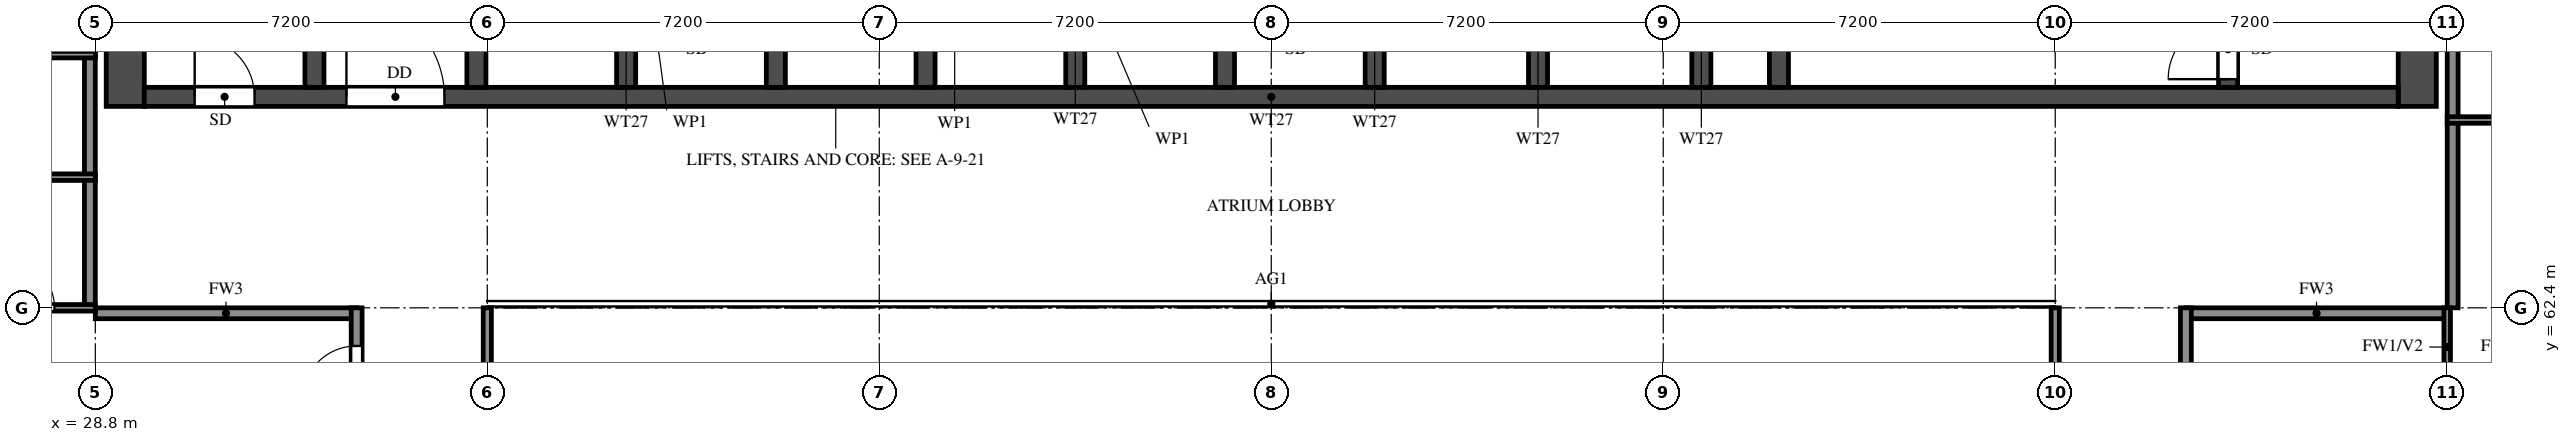
"""IFC4 building model, lengths in metres.
Left out: names, types, materials, properties, quantities, classifications, styles, units other than length and angle.
Written with IfcOpenShell. Run it as: python <this file> out.ifc"""

import sys

from ifc_helpers import new_model, si_unit, direction, frame, frame_2d, origin, place, context, subcontext, project, spatial, rectangle, extrude, element, fill, save


model = new_model("IFC4")
c1 = context("Model", 3, precision=1e-05, world=origin(), true_north=direction((0.0, 1.0)))
c2 = subcontext(c1, "Body", "Model", "MODEL_VIEW")
j1 = project(units=[si_unit("LENGTHUNIT", "METRE"), si_unit("PLANEANGLEUNIT", "RADIAN")], contexts=[c1])
p1 = place(None, origin())
s1 = spatial("IfcSite", under=j1, at=p1, CompositionType="ELEMENT")
p2 = place(p1, origin())
s2 = spatial("IfcBuilding", under=s1, at=p2, CompositionType="ELEMENT")
p3 = place(p2, frame((0.0, 0.0, 150.0)))
s3 = spatial("IfcBuildingStorey", under=s2, at=p3, CompositionType="ELEMENT", Elevation=150.0)
for number, where, z_axis, x_axis in (
    (1, (29.35, 66.1, 0.0), (0.0, 0.0, 1.0), (0.0, 1.0, 0.0)),
    (2, (71.45, 66.1, 0.0), (0.0, 0.0, 1.0), (0.0, 1.0, 0.0)),
):
    element("IfcWall", number, at=place(p3, frame(where, z_axis=z_axis, x_axis=x_axis)), inside=s3, PredefinedType="SHEAR", context=c2, shape_type="SweptSolid", body=[
        extrude(rectangle(XDim=11.9, YDim=0.7, at=frame_2d((5.95, 0.0))), origin(), (0.0, 0.0, 1.0), 3.2),
    ])
p4 = place(p3, frame((29.7, 66.275, 0.0), z_axis=(0.0, 0.0, 1.0), x_axis=(1.0, 0.0, 0.0)))
e3 = element("IfcWall", 3, at=p4, inside=s3, PredefinedType="SHEAR", context=c2, shape_type="SweptSolid", body=[
    extrude(rectangle(XDim=41.4, YDim=0.35, at=frame_2d((20.7, 0.0))), origin(), (0.0, 0.0, 1.0), 3.2),
])
p5 = place(p4, frame((0.925, 0.0, 0.0)))
e4 = element("IfcOpeningElement", 4, at=p5, cuts=e3, PredefinedType="OPENING", context=c2, shape_type="SweptSolid", body=[
    extrude(rectangle(XDim=1.1, YDim=2.1, at=frame_2d((0.55, 1.05))), frame((0.0, 0.185, 0.0), z_axis=(0.0, -1.0, 0.0), x_axis=(1.0, 0.0, 0.0)), (0.0, 0.0, 1.0), 0.37),
])
p6 = place(p4, frame((3.712, 0.0, 0.0)))
e5 = element("IfcOpeningElement", 5, at=p6, cuts=e3, PredefinedType="OPENING", context=c2, shape_type="SweptSolid", body=[
    extrude(rectangle(XDim=1.8, YDim=2.1, at=frame_2d((0.9, 1.05))), frame((0.0, 0.185, 0.0), z_axis=(0.0, -1.0, 0.0), x_axis=(1.0, 0.0, 0.0)), (0.0, 0.0, 1.0), 0.37),
])
p7 = place(p3, frame((32.825, 66.45, 0.0), z_axis=(0.0, 0.0, 1.0), x_axis=(0.0, 1.0, 0.0)))
e6 = element("IfcWall", 6, at=p7, inside=s3, PredefinedType="SHEAR", context=c2, shape_type="SweptSolid", body=[
    extrude(rectangle(XDim=10.85, YDim=0.35, at=frame_2d((5.425, 0.0))), origin(), (0.0, 0.0, 1.0), 3.2),
])
p8 = place(p3, frame((67.975, 66.45, 0.0), z_axis=(0.0, 0.0, 1.0), x_axis=(0.0, 1.0, 0.0)))
e7 = element("IfcWall", 7, at=p8, inside=s3, PredefinedType="SHEAR", context=c2, shape_type="SweptSolid", body=[
    extrude(rectangle(XDim=10.85, YDim=0.35, at=frame_2d((5.425, 0.0))), origin(), (0.0, 0.0, 1.0), 3.2),
])
p9 = place(p8, frame((0.15, 0.0, 0.0)))
e8 = element("IfcOpeningElement", 8, at=p9, cuts=e7, PredefinedType="OPENING", context=c2, shape_type="SweptSolid", body=[
    extrude(rectangle(XDim=1.1, YDim=2.1, at=frame_2d((0.55, 1.05))), frame((0.0, 0.185, 0.0), z_axis=(0.0, -1.0, 0.0), x_axis=(1.0, 0.0, 0.0)), (0.0, 0.0, 1.0), 0.37),
])
p10 = place(p3, frame((59.725, 66.45, 0.0), z_axis=(0.0, 0.0, 1.0), x_axis=(0.0, 1.0, 0.0)))
e9 = element("IfcWall", 9, at=p10, inside=s3, PredefinedType="SHEAR", context=c2, shape_type="SweptSolid", body=[
    extrude(rectangle(XDim=6.125, YDim=0.35, at=frame_2d((3.062, 0.0))), origin(), (0.0, 0.0, 1.0), 3.2),
])
p11 = place(p10, frame((3.85, 0.0, 0.0)))
e10 = element("IfcOpeningElement", 10, at=p11, cuts=e9, PredefinedType="OPENING", context=c2, shape_type="SweptSolid", body=[
    extrude(rectangle(XDim=1.2, YDim=2.1, at=frame_2d((0.6, 1.05))), frame((0.0, 0.185, 0.0), z_axis=(0.0, -1.0, 0.0), x_axis=(1.0, 0.0, 0.0)), (0.0, 0.0, 1.0), 0.37),
])
for number, where, z_axis, x_axis in (
    (11, (35.8, 66.45, 0.0), (0.0, 0.0, 1.0), (0.0, 1.0, 0.0)),
    (12, (38.55, 66.45, 0.0), (0.0, 0.0, 1.0), (0.0, 1.0, 0.0)),
    (13, (41.3, 66.45, 0.0), (0.0, 0.0, 1.0), (0.0, 1.0, 0.0)),
    (14, (44.05, 66.45, 0.0), (0.0, 0.0, 1.0), (0.0, 1.0, 0.0)),
    (15, (46.8, 66.45, 0.0), (0.0, 0.0, 1.0), (0.0, 1.0, 0.0)),
    (16, (49.55, 66.45, 0.0), (0.0, 0.0, 1.0), (0.0, 1.0, 0.0)),
    (17, (52.3, 66.45, 0.0), (0.0, 0.0, 1.0), (0.0, 1.0, 0.0)),
    (18, (55.3, 66.45, 0.0), (0.0, 0.0, 1.0), (0.0, 1.0, 0.0)),
    (19, (58.3, 66.45, 0.0), (0.0, 0.0, 1.0), (0.0, 1.0, 0.0)),
):
    element("IfcWall", number, at=place(p3, frame(where, z_axis=z_axis, x_axis=x_axis)), inside=s3, PredefinedType="SHEAR", context=c2, shape_type="SweptSolid", body=[
        extrude(rectangle(XDim=2.425, YDim=0.35, at=frame_2d((1.212, 0.0))), origin(), (0.0, 0.0, 1.0), 3.2),
    ])
for number, where, z_axis, x_axis in (
    (20, (28.8, 62.3, 0.0), (0.0, 0.0, 1.0), (1.0, 0.0, 0.0)),
    (21, (67.2, 62.3, 0.0), (0.0, 0.0, 1.0), (1.0, 0.0, 0.0)),
):
    element("IfcWall", number, at=place(p3, frame(where, z_axis=z_axis, x_axis=x_axis)), inside=s3, PredefinedType="SOLIDWALL", context=c2, shape_type="SweptSolid", body=[
        extrude(rectangle(XDim=4.8, YDim=0.2, at=frame_2d((2.4, 0.0))), origin(), (0.0, 0.0, 1.0), 3.2),
    ])
p12 = place(p3, frame((28.7, 62.4, 0.0), z_axis=(0.0, 0.0, 1.0), x_axis=(0.0, 1.0, 0.0)))
e22 = element("IfcWall", 22, at=p12, inside=s3, PredefinedType="SOLIDWALL", context=c2, shape_type="SweptSolid", body=[
    extrude(rectangle(XDim=15.6, YDim=0.2, at=frame_2d((7.8, 0.0))), origin(), (0.0, 0.0, 1.0), 3.2),
])
p13 = place(p3, frame((33.6, 45.6, 0.0), z_axis=(0.0, 0.0, 1.0), x_axis=(0.0, 1.0, 0.0)))
e23 = element("IfcWall", 23, at=p13, inside=s3, PredefinedType="SOLIDWALL", context=c2, shape_type="SweptSolid", body=[
    extrude(rectangle(XDim=16.8, YDim=0.2, at=frame_2d((8.4, 0.0))), origin(), (0.0, 0.0, 1.0), 3.2),
])
p14 = place(p13, frame((0.7, 0.0, 0.0)))
e24 = element("IfcOpeningElement", 24, at=p14, cuts=e23, PredefinedType="OPENING", context=c2, shape_type="SweptSolid", body=[
    extrude(rectangle(XDim=1.0, YDim=2.1, at=frame_2d((0.5, 1.05))), frame((0.0, 0.11, 0.0), z_axis=(0.0, -1.0, 0.0), x_axis=(1.0, 0.0, 0.0)), (0.0, 0.0, 1.0), 0.22),
])
p15 = place(p13, frame((6.7, 0.0, 0.0)))
e25 = element("IfcOpeningElement", 25, at=p15, cuts=e23, PredefinedType="OPENING", context=c2, shape_type="SweptSolid", body=[
    extrude(rectangle(XDim=1.0, YDim=2.1, at=frame_2d((0.5, 1.05))), frame((0.0, 0.11, 0.0), z_axis=(0.0, -1.0, 0.0), x_axis=(1.0, 0.0, 0.0)), (0.0, 0.0, 1.0), 0.22),
])
p16 = place(p13, frame((15.1, 0.0, 0.0)))
e26 = element("IfcOpeningElement", 26, at=p16, cuts=e23, PredefinedType="OPENING", context=c2, shape_type="SweptSolid", body=[
    extrude(rectangle(XDim=1.0, YDim=2.1, at=frame_2d((0.5, 1.05))), frame((0.0, 0.11, 0.0), z_axis=(0.0, -1.0, 0.0), x_axis=(1.0, 0.0, 0.0)), (0.0, 0.0, 1.0), 0.22),
])
p17 = place(p3, frame((67.2, 56.4, 0.0), z_axis=(0.0, 0.0, 1.0), x_axis=(0.0, 1.0, 0.0)))
e27 = element("IfcWall", 27, at=p17, inside=s3, PredefinedType="SOLIDWALL", context=c2, shape_type="SweptSolid", body=[
    extrude(rectangle(XDim=6.0, YDim=0.2, at=frame_2d((3.0, 0.0))), origin(), (0.0, 0.0, 1.0), 3.2),
])
p18 = place(p17, frame((3.7, 0.0, 0.0)))
e28 = element("IfcOpeningElement", 28, at=p18, cuts=e27, PredefinedType="OPENING", context=c2, shape_type="SweptSolid", body=[
    extrude(rectangle(XDim=1.0, YDim=2.1, at=frame_2d((0.5, 1.05))), frame((0.0, 0.11, 0.0), z_axis=(0.0, -1.0, 0.0), x_axis=(1.0, 0.0, 0.0)), (0.0, 0.0, 1.0), 0.22),
])
p19 = place(p3, frame((72.1, 62.4, 0.0), z_axis=(0.0, 0.0, 1.0), x_axis=(0.0, 1.0, 0.0)))
e29 = element("IfcWall", 29, at=p19, inside=s3, PredefinedType="SOLIDWALL", context=c2, shape_type="SweptSolid", body=[
    extrude(rectangle(XDim=15.6, YDim=0.2, at=frame_2d((7.8, 0.0))), origin(), (0.0, 0.0, 1.0), 3.2),
])
p20 = place(p3, frame((26.4, 62.4, 0.0), z_axis=(0.0, 0.0, 1.0), x_axis=(1.0, 0.0, 0.0)))
e30 = element("IfcWall", 30, at=p20, inside=s3, PredefinedType="PARTITIONING", context=c2, shape_type="SweptSolid", body=[
    extrude(rectangle(XDim=2.4, YDim=0.12, at=frame_2d((1.2, 0.0))), origin(), (0.0, 0.0, 1.0), 3.2),
])
p21 = place(p20, frame((0.75, 0.0, 0.0)))
e31 = element("IfcOpeningElement", 31, at=p21, cuts=e30, PredefinedType="OPENING", context=c2, shape_type="SweptSolid", body=[
    extrude(rectangle(XDim=0.9, YDim=2.1, at=frame_2d((0.45, 1.05))), frame((0.0, 0.07, 0.0), z_axis=(0.0, -1.0, 0.0), x_axis=(1.0, 0.0, 0.0)), (0.0, 0.0, 1.0), 0.14),
])
p22 = place(p3, frame((23.7, 64.8, 0.0), z_axis=(0.0, 0.0, 1.0), x_axis=(1.0, 0.0, 0.0)))
e32 = element("IfcWall", 32, at=p22, inside=s3, PredefinedType="PARTITIONING", context=c2, shape_type="SweptSolid", body=[
    extrude(rectangle(XDim=5.1, YDim=0.12, at=frame_2d((2.55, 0.0))), origin(), (0.0, 0.0, 1.0), 3.2),
])
p23 = place(p22, frame((2.1, 0.0, 0.0)))
e33 = element("IfcOpeningElement", 33, at=p23, cuts=e32, PredefinedType="OPENING", context=c2, shape_type="SweptSolid", body=[
    extrude(rectangle(XDim=0.9, YDim=2.1, at=frame_2d((0.45, 1.05))), frame((0.0, 0.07, 0.0), z_axis=(0.0, -1.0, 0.0), x_axis=(1.0, 0.0, 0.0)), (0.0, 0.0, 1.0), 0.14),
])
for number, where, z_axis, x_axis in (
    (34, (72.0, 65.85, 0.0), (0.0, 0.0, 1.0), (1.0, 0.0, 0.0)),
    (35, (23.7, 67.05, 0.0), (0.0, 0.0, 1.0), (1.0, 0.0, 0.0)),
):
    element("IfcWall", number, at=place(p3, frame(where, z_axis=z_axis, x_axis=x_axis)), inside=s3, PredefinedType="PARTITIONING", context=c2, shape_type="SweptSolid", body=[
        extrude(rectangle(XDim=5.1, YDim=0.12, at=frame_2d((2.55, 0.0))), origin(), (0.0, 0.0, 1.0), 3.2),
    ])
p24 = place(p3, frame((72.0, 58.8, 0.0), z_axis=(0.0, 0.0, 1.0), x_axis=(0.0, 1.0, 0.0)))
e36 = element("IfcWall", 36, at=p24, inside=s3, PredefinedType="PARTITIONING", context=c2, shape_type="SweptSolid", body=[
    extrude(rectangle(XDim=3.6, YDim=0.12, at=frame_2d((1.8, 0.0))), origin(), (0.0, 0.0, 1.0), 3.2),
])
p25 = place(p24, frame((0.75, 0.0, 0.0)))
e37 = element("IfcOpeningElement", 37, at=p25, cuts=e36, PredefinedType="OPENING", context=c2, shape_type="SweptSolid", body=[
    extrude(rectangle(XDim=0.9, YDim=2.1, at=frame_2d((0.45, 1.05))), frame((0.0, 0.07, 0.0), z_axis=(0.0, -1.0, 0.0), x_axis=(1.0, 0.0, 0.0)), (0.0, 0.0, 1.0), 0.14),
])
for number, where, z_axis, x_axis in (
    (38, (36.0, 48.0, 0.0), (0.0, 0.0, 1.0), (0.0, 1.0, 0.0)),
    (39, (64.8, 48.0, 0.0), (0.0, 0.0, 1.0), (0.0, 1.0, 0.0)),
):
    element("IfcWall", number, at=place(p3, frame(where, z_axis=z_axis, x_axis=x_axis)), inside=s3, PredefinedType="SOLIDWALL", context=c2, shape_type="SweptSolid", body=[
        extrude(rectangle(XDim=14.4, YDim=0.15, at=frame_2d((7.2, 0.0))), origin(), (0.0, 0.0, 1.0), 2.3),
    ])
p26 = place(p5, origin())
e40 = element("IfcDoor", 40, at=p26, inside=s3, OperationType="SINGLE_SWING_LEFT", PredefinedType="DOOR", context=c2, shape_type="SweptSolid", body=[
    extrude(rectangle(XDim=1.1, YDim=2.1, at=frame_2d((0.55, 1.05))), frame((0.0, 0.025, 0.0), z_axis=(0.0, -1.0, 0.0), x_axis=(1.0, 0.0, 0.0)), (0.0, 0.0, 1.0), 0.05),
])
fill(e4, e40)
p27 = place(p9, origin())
e41 = element("IfcDoor", 41, at=p27, inside=s3, OperationType="SINGLE_SWING_LEFT", PredefinedType="DOOR", context=c2, shape_type="SweptSolid", body=[
    extrude(rectangle(XDim=1.1, YDim=2.1, at=frame_2d((0.55, 1.05))), frame((0.0, 0.025, 0.0), z_axis=(0.0, -1.0, 0.0), x_axis=(1.0, 0.0, 0.0)), (0.0, 0.0, 1.0), 0.05),
])
fill(e8, e41)
p28 = place(p6, origin())
e42 = element("IfcDoor", 42, at=p28, inside=s3, OperationType="DOUBLE_DOOR_SINGLE_SWING", PredefinedType="DOOR", context=c2, shape_type="SweptSolid", body=[
    extrude(rectangle(XDim=1.8, YDim=2.1, at=frame_2d((0.9, 1.05))), frame((0.0, 0.025, 0.0), z_axis=(0.0, -1.0, 0.0), x_axis=(1.0, 0.0, 0.0)), (0.0, 0.0, 1.0), 0.05),
])
fill(e5, e42)
p29 = place(p21, origin())
e43 = element("IfcDoor", 43, at=p29, inside=s3, OperationType="SINGLE_SWING_RIGHT", PredefinedType="DOOR", context=c2, shape_type="SweptSolid", body=[
    extrude(rectangle(XDim=0.9, YDim=2.1, at=frame_2d((0.45, 1.05))), frame((0.0, 0.025, 0.0), z_axis=(0.0, -1.0, 0.0), x_axis=(1.0, 0.0, 0.0)), (0.0, 0.0, 1.0), 0.05),
])
fill(e31, e43)
p30 = place(p16, origin())
e44 = element("IfcDoor", 44, at=p30, inside=s3, OperationType="SINGLE_SWING_LEFT", PredefinedType="DOOR", context=c2, shape_type="SweptSolid", body=[
    extrude(rectangle(XDim=1.0, YDim=2.1, at=frame_2d((0.5, 1.05))), frame((0.0, 0.025, 0.0), z_axis=(0.0, -1.0, 0.0), x_axis=(1.0, 0.0, 0.0)), (0.0, 0.0, 1.0), 0.05),
])
fill(e26, e44)
save(model, sys.argv[1])
